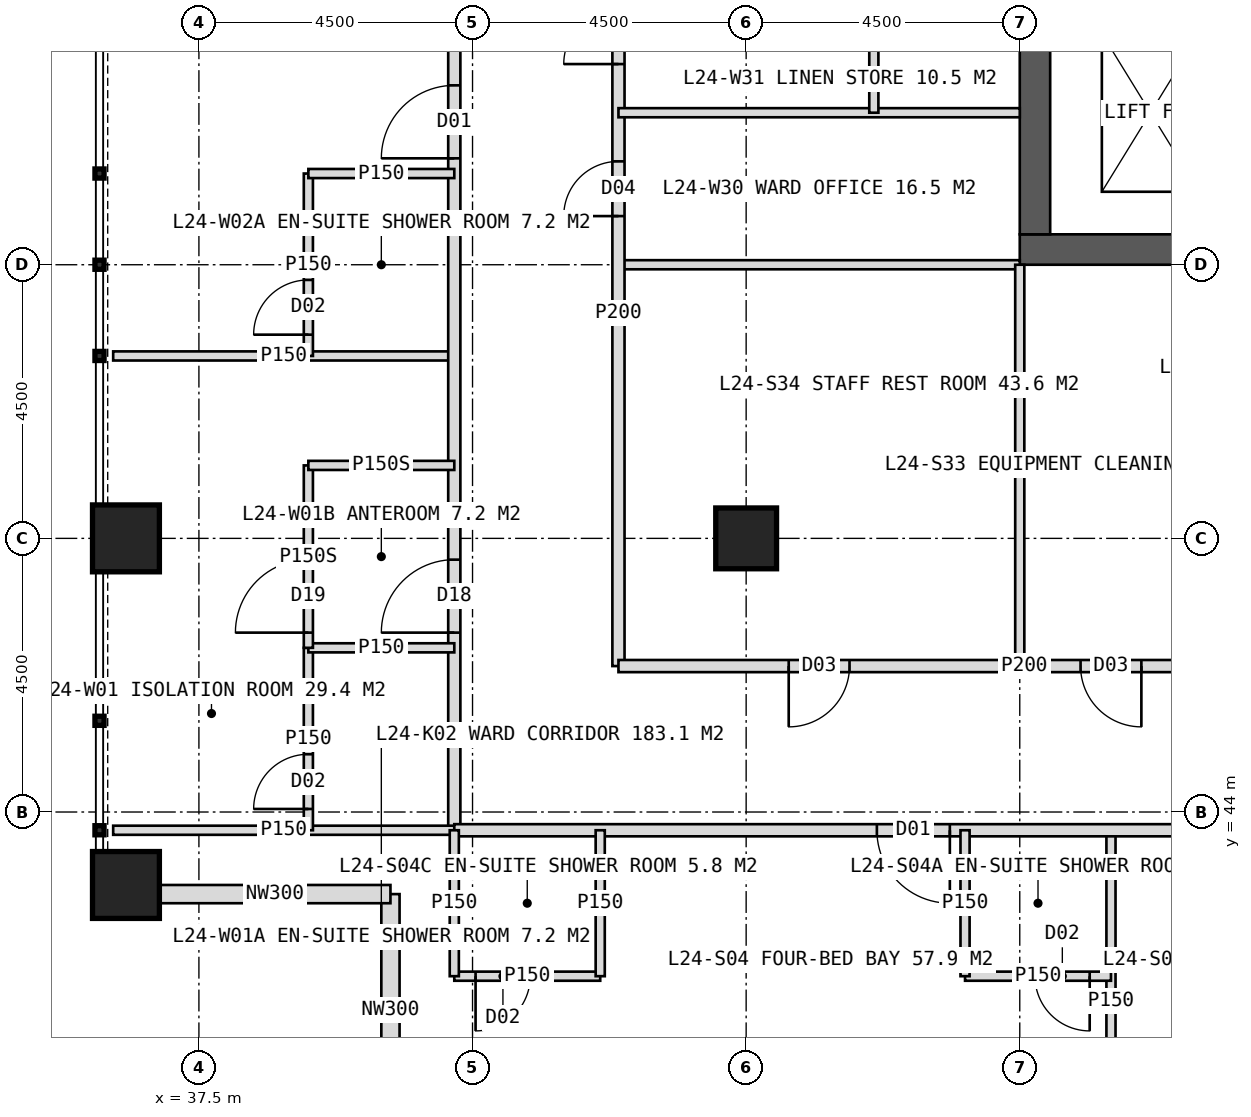
"""IFC4 building model, lengths in metres.
Left out: names, types, materials, properties, quantities, classifications, styles, units other than length and angle.
Written with IfcOpenShell. Run it as: python <this file> out.ifc"""

import sys

from ifc_helpers import new_model, si_unit, direction, frame, frame_2d, origin, origin_2d, place, context, subcontext, project, spatial, rectangle, hollow_rectangle, extrude, element, fill, save


model = new_model("IFC4")
c1 = context("Model", 3, precision=1e-05, world=origin(), true_north=direction((0.0, 1.0)))
c2 = subcontext(c1, "Body", "Model", "MODEL_VIEW")
j1 = project(units=[si_unit("LENGTHUNIT", "METRE"), si_unit("PLANEANGLEUNIT", "RADIAN")], contexts=[c1])
p1 = place(None, origin())
s1 = spatial("IfcSite", under=j1, at=p1, CompositionType="ELEMENT")
p2 = place(p1, origin())
s2 = spatial("IfcBuilding", under=s1, at=p2, CompositionType="ELEMENT")
p3 = place(p2, frame((0.0, 0.0, 104.0)))
s3 = spatial("IfcBuildingStorey", under=s2, at=p3, CompositionType="ELEMENT", Elevation=104.0)
p4 = place(p3, frame((51.0, 53.25, 0.0), z_axis=(0.0, 0.0, 1.0), x_axis=(1.0, 0.0, 0.0)))
e1 = element("IfcWall", 1, at=p4, inside=s3, PredefinedType="SHEAR", context=c2, shape_type="SweptSolid", body=[
    extrude(rectangle(XDim=18.0, YDim=0.5, at=frame_2d((9.0, 0.0))), origin(), (0.0, 0.0, 1.0), 4.0),
])
p5 = place(p4, frame((8.1, 0.0, 0.0)))
e2 = element("IfcOpeningElement", 2, at=p5, cuts=e1, PredefinedType="OPENING", context=c2, shape_type="SweptSolid", body=[
    extrude(rectangle(XDim=1.8, YDim=2.2, at=frame_2d((0.9, 1.1))), frame((0.0, 0.26, 0.0), z_axis=(0.0, -1.0, 0.0), x_axis=(1.0, 0.0, 0.0)), (0.0, 0.0, 1.0), 0.52),
])
p6 = place(p3, frame((51.25, 53.5, 0.0), z_axis=(0.0, 0.0, 1.0), x_axis=(0.0, 1.0, 0.0)))
e3 = element("IfcWall", 3, at=p6, inside=s3, PredefinedType="SHEAR", context=c2, shape_type="SweptSolid", body=[
    extrude(rectangle(XDim=17.0, YDim=0.5, at=frame_2d((8.5, 0.0))), origin(), (0.0, 0.0, 1.0), 4.0),
])
p7 = place(p6, frame((6.0, 0.0, 0.0)))
e4 = element("IfcOpeningElement", 4, at=p7, cuts=e3, PredefinedType="OPENING", context=c2, shape_type="SweptSolid", body=[
    extrude(rectangle(XDim=1.5, YDim=2.2, at=frame_2d((0.75, 1.1))), frame((0.0, 0.26, 0.0), z_axis=(0.0, -1.0, 0.0), x_axis=(1.0, 0.0, 0.0)), (0.0, 0.0, 1.0), 0.52),
])
p8 = place(p3, frame((46.5, 48.5, 0.0), z_axis=(0.0, 0.0, 1.0), x_axis=(1.0, 0.0, 0.0)))
e5 = element("IfcColumn", 5, at=p8, inside=s3, PredefinedType="COLUMN", context=c2, shape_type="SweptSolid", body=[
    extrude(hollow_rectangle(XDim=1.0, YDim=1.0, WallThickness=0.1, at=origin_2d()), origin(), (0.0, 0.0, 1.0), 4.0),
])
for number, where, z_axis, x_axis in (
    (6, (36.3, 42.8, 0.0), (0.0, 0.0, 1.0), (1.0, 0.0, 0.0)),
    (7, (36.3, 48.5, 0.0), (0.0, 0.0, 1.0), (1.0, 0.0, 0.0)),
):
    element("IfcColumn", number, at=place(p3, frame(where, z_axis=z_axis, x_axis=x_axis)), inside=s3, PredefinedType="COLUMN", context=c2, shape_type="SweptSolid", body=[
        extrude(hollow_rectangle(XDim=1.1, YDim=1.1, WallThickness=0.1, at=origin_2d()), origin(), (0.0, 0.0, 1.0), 4.0),
    ])
for number, where, z_axis, x_axis in (
    (8, (40.65, 38.85, 0.0), (0.0, 0.0, 1.0), (0.0, 1.0, 0.0)),
    (9, (40.65, 42.65, 0.0), (0.0, 0.0, 1.0), (-1.0, 0.0, 0.0)),
):
    element("IfcWall", number, at=place(p3, frame(where, z_axis=z_axis, x_axis=x_axis)), inside=s3, PredefinedType="ELEMENTEDWALL", context=c2, shape_type="SweptSolid", body=[
        extrude(rectangle(XDim=3.8, YDim=0.3, at=frame_2d((1.9, 0.0))), origin(), (0.0, 0.0, 1.0), 4.0),
    ])
p9 = place(p3, frame((41.7, 51.5, 0.0), z_axis=(0.0, 0.0, 1.0), x_axis=(-1.0, 0.0, 0.0)))
e10 = element("IfcWall", 10, at=p9, inside=s3, PredefinedType="PARTITIONING", context=c2, shape_type="SweptSolid", body=[
    extrude(rectangle(XDim=5.61, YDim=0.15, at=frame_2d((2.805, 0.0))), origin(), (0.0, 0.0, 1.0), 3.75),
])
p10 = place(p3, frame((41.7, 43.7, 0.0), z_axis=(0.0, 0.0, 1.0), x_axis=(0.0, 1.0, 0.0)))
e11 = element("IfcWall", 11, at=p10, inside=s3, PredefinedType="PARTITIONING", context=c2, shape_type="SweptSolid", body=[
    extrude(rectangle(XDim=36.6, YDim=0.2, at=frame_2d((18.3, 0.0))), origin(), (0.0, 0.0, 1.0), 3.75),
])
p11 = place(p10, frame((3.25, 0.0, 0.0)))
e12 = element("IfcOpeningElement", 12, at=p11, cuts=e11, PredefinedType="OPENING", context=c2, shape_type="SweptSolid", body=[
    extrude(rectangle(XDim=1.2, YDim=2.2, at=frame_2d((0.6, 1.1))), frame((0.0, 0.11, 0.0), z_axis=(0.0, -1.0, 0.0), x_axis=(1.0, 0.0, 0.0)), (0.0, 0.0, 1.0), 0.22),
])
p12 = place(p10, frame((11.05, 0.0, 0.0)))
e13 = element("IfcOpeningElement", 13, at=p12, cuts=e11, PredefinedType="OPENING", context=c2, shape_type="SweptSolid", body=[
    extrude(rectangle(XDim=1.2, YDim=2.2, at=frame_2d((0.6, 1.1))), frame((0.0, 0.11, 0.0), z_axis=(0.0, -1.0, 0.0), x_axis=(1.0, 0.0, 0.0)), (0.0, 0.0, 1.0), 0.22),
])
p13 = place(p10, frame((21.55, 0.0, 0.0)))
e14 = element("IfcOpeningElement", 14, at=p13, cuts=e11, PredefinedType="OPENING", context=c2, shape_type="SweptSolid", body=[
    extrude(rectangle(XDim=1.2, YDim=2.2, at=frame_2d((0.6, 1.1))), frame((0.0, 0.11, 0.0), z_axis=(0.0, -1.0, 0.0), x_axis=(1.0, 0.0, 0.0)), (0.0, 0.0, 1.0), 0.22),
])
p14 = place(p10, frame((32.05, 0.0, 0.0)))
e15 = element("IfcOpeningElement", 15, at=p14, cuts=e11, PredefinedType="OPENING", context=c2, shape_type="SweptSolid", body=[
    extrude(rectangle(XDim=1.2, YDim=2.2, at=frame_2d((0.6, 1.1))), frame((0.0, 0.11, 0.0), z_axis=(0.0, -1.0, 0.0), x_axis=(1.0, 0.0, 0.0)), (0.0, 0.0, 1.0), 0.22),
])
p15 = place(p3, frame((41.7, 43.7, 0.0), z_axis=(0.0, 0.0, 1.0), x_axis=(-1.0, 0.0, 0.0)))
e16 = element("IfcWall", 16, at=p15, inside=s3, PredefinedType="PARTITIONING", context=c2, shape_type="SweptSolid", body=[
    extrude(rectangle(XDim=5.61, YDim=0.15, at=frame_2d((2.805, 0.0))), origin(), (0.0, 0.0, 1.0), 3.75),
])
p16 = place(p3, frame((39.3, 43.7, 0.0), z_axis=(0.0, 0.0, 1.0), x_axis=(0.0, 1.0, 0.0)))
e17 = element("IfcWall", 17, at=p16, inside=s3, PredefinedType="PARTITIONING", context=c2, shape_type="SweptSolid", body=[
    extrude(rectangle(XDim=3.0, YDim=0.15, at=frame_2d((1.5, 0.0))), origin(), (0.0, 0.0, 1.0), 3.75),
])
p17 = place(p16, frame((0.35, 0.0, 0.0)))
e18 = element("IfcOpeningElement", 18, at=p17, cuts=e17, PredefinedType="OPENING", context=c2, shape_type="SweptSolid", body=[
    extrude(rectangle(XDim=0.9, YDim=2.1, at=frame_2d((0.45, 1.05))), frame((0.0, 0.085, 0.0), z_axis=(0.0, -1.0, 0.0), x_axis=(1.0, 0.0, 0.0)), (0.0, 0.0, 1.0), 0.17),
])
p18 = place(p3, frame((41.7, 46.7, 0.0), z_axis=(0.0, 0.0, 1.0), x_axis=(-1.0, 0.0, 0.0)))
e19 = element("IfcWall", 19, at=p18, inside=s3, PredefinedType="PARTITIONING", context=c2, shape_type="SweptSolid", body=[
    extrude(rectangle(XDim=2.4, YDim=0.15, at=frame_2d((1.2, 0.0))), origin(), (0.0, 0.0, 1.0), 3.75),
])
p19 = place(p3, frame((39.3, 46.7, 0.0), z_axis=(0.0, 0.0, 1.0), x_axis=(0.0, 1.0, 0.0)))
e20 = element("IfcWall", 20, at=p19, inside=s3, PredefinedType="PARTITIONING", context=c2, shape_type="SweptSolid", body=[
    extrude(rectangle(XDim=3.0, YDim=0.15, at=frame_2d((1.5, 0.0))), origin(), (0.0, 0.0, 1.0), 3.75),
])
p20 = place(p19, frame((0.25, 0.0, 0.0)))
e21 = element("IfcOpeningElement", 21, at=p20, cuts=e20, PredefinedType="OPENING", context=c2, shape_type="SweptSolid", body=[
    extrude(rectangle(XDim=1.2, YDim=2.2, at=frame_2d((0.6, 1.1))), frame((0.0, 0.085, 0.0), z_axis=(0.0, -1.0, 0.0), x_axis=(1.0, 0.0, 0.0)), (0.0, 0.0, 1.0), 0.17),
])
p21 = place(p3, frame((41.7, 49.7, 0.0), z_axis=(0.0, 0.0, 1.0), x_axis=(-1.0, 0.0, 0.0)))
e22 = element("IfcWall", 22, at=p21, inside=s3, PredefinedType="PARTITIONING", context=c2, shape_type="SweptSolid", body=[
    extrude(rectangle(XDim=2.4, YDim=0.15, at=frame_2d((1.2, 0.0))), origin(), (0.0, 0.0, 1.0), 3.75),
])
p22 = place(p3, frame((39.3, 51.5, 0.0), z_axis=(0.0, 0.0, 1.0), x_axis=(0.0, 1.0, 0.0)))
e23 = element("IfcWall", 23, at=p22, inside=s3, PredefinedType="PARTITIONING", context=c2, shape_type="SweptSolid", body=[
    extrude(rectangle(XDim=3.0, YDim=0.15, at=frame_2d((1.5, 0.0))), origin(), (0.0, 0.0, 1.0), 3.75),
])
p23 = place(p22, frame((0.35, 0.0, 0.0)))
e24 = element("IfcOpeningElement", 24, at=p23, cuts=e23, PredefinedType="OPENING", context=c2, shape_type="SweptSolid", body=[
    extrude(rectangle(XDim=0.9, YDim=2.1, at=frame_2d((0.45, 1.05))), frame((0.0, 0.085, 0.0), z_axis=(0.0, -1.0, 0.0), x_axis=(1.0, 0.0, 0.0)), (0.0, 0.0, 1.0), 0.17),
])
p24 = place(p3, frame((41.7, 54.5, 0.0), z_axis=(0.0, 0.0, 1.0), x_axis=(-1.0, 0.0, 0.0)))
e25 = element("IfcWall", 25, at=p24, inside=s3, PredefinedType="PARTITIONING", context=c2, shape_type="SweptSolid", body=[
    extrude(rectangle(XDim=2.4, YDim=0.15, at=frame_2d((1.2, 0.0))), origin(), (0.0, 0.0, 1.0), 3.75),
])
p25 = place(p3, frame((51.0, 53.0, 0.0), z_axis=(0.0, 0.0, 1.0), x_axis=(-1.0, 0.0, 0.0)))
e26 = element("IfcWall", 26, at=p25, inside=s3, PredefinedType="PARTITIONING", context=c2, shape_type="SweptSolid", body=[
    extrude(rectangle(XDim=6.6, YDim=0.15, at=frame_2d((3.3, 0.0))), origin(), (0.0, 0.0, 1.0), 3.75),
])
p26 = place(p3, frame((44.4, 46.4, 0.0), z_axis=(0.0, 0.0, 1.0), x_axis=(0.0, 1.0, 0.0)))
e27 = element("IfcWall", 27, at=p26, inside=s3, PredefinedType="PARTITIONING", context=c2, shape_type="SweptSolid", body=[
    extrude(rectangle(XDim=11.6, YDim=0.2, at=frame_2d((5.8, 0.0))), origin(), (0.0, 0.0, 1.0), 3.75),
])
p27 = place(p26, frame((7.4, 0.0, 0.0)))
e28 = element("IfcOpeningElement", 28, at=p27, cuts=e27, PredefinedType="OPENING", context=c2, shape_type="SweptSolid", body=[
    extrude(rectangle(XDim=0.9, YDim=2.1, at=frame_2d((0.45, 1.05))), frame((0.0, 0.11, 0.0), z_axis=(0.0, -1.0, 0.0), x_axis=(1.0, 0.0, 0.0)), (0.0, 0.0, 1.0), 0.22),
])
p28 = place(p26, frame((9.9, 0.0, 0.0)))
e29 = element("IfcOpeningElement", 29, at=p28, cuts=e27, PredefinedType="OPENING", context=c2, shape_type="SweptSolid", body=[
    extrude(rectangle(XDim=0.9, YDim=2.1, at=frame_2d((0.45, 1.05))), frame((0.0, 0.11, 0.0), z_axis=(0.0, -1.0, 0.0), x_axis=(1.0, 0.0, 0.0)), (0.0, 0.0, 1.0), 0.22),
])
p29 = place(p3, frame((51.0, 55.5, 0.0), z_axis=(0.0, 0.0, 1.0), x_axis=(-1.0, 0.0, 0.0)))
e30 = element("IfcWall", 30, at=p29, inside=s3, PredefinedType="PARTITIONING", context=c2, shape_type="SweptSolid", body=[
    extrude(rectangle(XDim=6.6, YDim=0.15, at=frame_2d((3.3, 0.0))), origin(), (0.0, 0.0, 1.0), 3.75),
])
p30 = place(p3, frame((48.6, 55.5, 0.0), z_axis=(0.0, 0.0, 1.0), x_axis=(0.0, 1.0, 0.0)))
e31 = element("IfcWall", 31, at=p30, inside=s3, PredefinedType="PARTITIONING", context=c2, shape_type="SweptSolid", body=[
    extrude(rectangle(XDim=2.5, YDim=0.15, at=frame_2d((1.25, 0.0))), origin(), (0.0, 0.0, 1.0), 3.75),
])
p31 = place(p3, frame((52.5, 43.7, 0.0), z_axis=(0.0, 0.0, 1.0), x_axis=(0.0, -1.0, 0.0)))
e32 = element("IfcWall", 32, at=p31, inside=s3, PredefinedType="PARTITIONING", context=c2, shape_type="SweptSolid", body=[
    extrude(rectangle(XDim=5.61, YDim=0.15, at=frame_2d((2.805, 0.0))), origin(), (0.0, 0.0, 1.0), 3.75),
])
p32 = place(p3, frame((78.3, 43.7, 0.0), z_axis=(0.0, 0.0, 1.0), x_axis=(-1.0, 0.0, 0.0)))
e33 = element("IfcWall", 33, at=p32, inside=s3, PredefinedType="PARTITIONING", context=c2, shape_type="SweptSolid", body=[
    extrude(rectangle(XDim=36.6, YDim=0.2, at=frame_2d((18.3, 0.0))), origin(), (0.0, 0.0, 1.0), 3.75),
])
p33 = place(p32, frame((3.25, 0.0, 0.0)))
e34 = element("IfcOpeningElement", 34, at=p33, cuts=e33, PredefinedType="OPENING", context=c2, shape_type="SweptSolid", body=[
    extrude(rectangle(XDim=1.2, YDim=2.2, at=frame_2d((0.6, 1.1))), frame((0.0, 0.11, 0.0), z_axis=(0.0, -1.0, 0.0), x_axis=(1.0, 0.0, 0.0)), (0.0, 0.0, 1.0), 0.22),
])
p34 = place(p32, frame((11.05, 0.0, 0.0)))
e35 = element("IfcOpeningElement", 35, at=p34, cuts=e33, PredefinedType="OPENING", context=c2, shape_type="SweptSolid", body=[
    extrude(rectangle(XDim=1.2, YDim=2.2, at=frame_2d((0.6, 1.1))), frame((0.0, 0.11, 0.0), z_axis=(0.0, -1.0, 0.0), x_axis=(1.0, 0.0, 0.0)), (0.0, 0.0, 1.0), 0.22),
])
p35 = place(p32, frame((20.05, 0.0, 0.0)))
e36 = element("IfcOpeningElement", 36, at=p35, cuts=e33, PredefinedType="OPENING", context=c2, shape_type="SweptSolid", body=[
    extrude(rectangle(XDim=1.2, YDim=2.2, at=frame_2d((0.6, 1.1))), frame((0.0, 0.11, 0.0), z_axis=(0.0, -1.0, 0.0), x_axis=(1.0, 0.0, 0.0)), (0.0, 0.0, 1.0), 0.22),
])
p36 = place(p32, frame((28.45, 0.0, 0.0)))
e37 = element("IfcOpeningElement", 37, at=p36, cuts=e33, PredefinedType="OPENING", context=c2, shape_type="SweptSolid", body=[
    extrude(rectangle(XDim=1.2, YDim=2.2, at=frame_2d((0.6, 1.1))), frame((0.0, 0.11, 0.0), z_axis=(0.0, -1.0, 0.0), x_axis=(1.0, 0.0, 0.0)), (0.0, 0.0, 1.0), 0.22),
])
p37 = place(p3, frame((52.5, 41.3, 0.0), z_axis=(0.0, 0.0, 1.0), x_axis=(-1.0, 0.0, 0.0)))
e38 = element("IfcWall", 38, at=p37, inside=s3, PredefinedType="PARTITIONING", context=c2, shape_type="SweptSolid", body=[
    extrude(rectangle(XDim=2.4, YDim=0.15, at=frame_2d((1.2, 0.0))), origin(), (0.0, 0.0, 1.0), 3.75),
])
p38 = place(p37, frame((0.35, 0.0, 0.0)))
e39 = element("IfcOpeningElement", 39, at=p38, cuts=e38, PredefinedType="OPENING", context=c2, shape_type="SweptSolid", body=[
    extrude(rectangle(XDim=0.9, YDim=2.1, at=frame_2d((0.45, 1.05))), frame((0.0, 0.085, 0.0), z_axis=(0.0, -1.0, 0.0), x_axis=(1.0, 0.0, 0.0)), (0.0, 0.0, 1.0), 0.17),
])
p39 = place(p3, frame((50.1, 43.7, 0.0), z_axis=(0.0, 0.0, 1.0), x_axis=(0.0, -1.0, 0.0)))
e40 = element("IfcWall", 40, at=p39, inside=s3, PredefinedType="PARTITIONING", context=c2, shape_type="SweptSolid", body=[
    extrude(rectangle(XDim=2.4, YDim=0.15, at=frame_2d((1.2, 0.0))), origin(), (0.0, 0.0, 1.0), 3.75),
])
p40 = place(p3, frame((44.1, 41.3, 0.0), z_axis=(0.0, 0.0, 1.0), x_axis=(-1.0, 0.0, 0.0)))
e41 = element("IfcWall", 41, at=p40, inside=s3, PredefinedType="PARTITIONING", context=c2, shape_type="SweptSolid", body=[
    extrude(rectangle(XDim=2.4, YDim=0.15, at=frame_2d((1.2, 0.0))), origin(), (0.0, 0.0, 1.0), 3.75),
])
p41 = place(p40, frame((1.15, 0.0, 0.0)))
e42 = element("IfcOpeningElement", 42, at=p41, cuts=e41, PredefinedType="OPENING", context=c2, shape_type="SweptSolid", body=[
    extrude(rectangle(XDim=0.9, YDim=2.1, at=frame_2d((0.45, 1.05))), frame((0.0, 0.085, 0.0), z_axis=(0.0, -1.0, 0.0), x_axis=(1.0, 0.0, 0.0)), (0.0, 0.0, 1.0), 0.17),
])
for number, where, z_axis, x_axis in (
    (43, (44.1, 43.7, 0.0), (0.0, 0.0, 1.0), (0.0, -1.0, 0.0)),
    (44, (41.7, 43.7, 0.0), (0.0, 0.0, 1.0), (0.0, -1.0, 0.0)),
):
    element("IfcWall", number, at=place(p3, frame(where, z_axis=z_axis, x_axis=x_axis)), inside=s3, PredefinedType="PARTITIONING", context=c2, shape_type="SweptSolid", body=[
        extrude(rectangle(XDim=2.4, YDim=0.15, at=frame_2d((1.2, 0.0))), origin(), (0.0, 0.0, 1.0), 3.75),
    ])
p42 = place(p3, frame((57.75, 46.4, 0.0), z_axis=(0.0, 0.0, 1.0), x_axis=(-1.0, 0.0, 0.0)))
e45 = element("IfcWall", 45, at=p42, inside=s3, PredefinedType="PARTITIONING", context=c2, shape_type="SweptSolid", body=[
    extrude(rectangle(XDim=13.35, YDim=0.2, at=frame_2d((6.675, 0.0))), origin(), (0.0, 0.0, 1.0), 3.75),
])
p43 = place(p42, frame((1.375, 0.0, 0.0)))
e46 = element("IfcOpeningElement", 46, at=p43, cuts=e45, PredefinedType="OPENING", context=c2, shape_type="SweptSolid", body=[
    extrude(rectangle(XDim=1.0, YDim=2.1, at=frame_2d((0.5, 1.05))), frame((0.0, 0.11, 0.0), z_axis=(0.0, -1.0, 0.0), x_axis=(1.0, 0.0, 0.0)), (0.0, 0.0, 1.0), 0.22),
])
p44 = place(p42, frame((4.75, 0.0, 0.0)))
e47 = element("IfcOpeningElement", 47, at=p44, cuts=e45, PredefinedType="OPENING", context=c2, shape_type="SweptSolid", body=[
    extrude(rectangle(XDim=1.0, YDim=2.1, at=frame_2d((0.5, 1.05))), frame((0.0, 0.11, 0.0), z_axis=(0.0, -1.0, 0.0), x_axis=(1.0, 0.0, 0.0)), (0.0, 0.0, 1.0), 0.22),
])
p45 = place(p42, frame((9.55, 0.0, 0.0)))
e48 = element("IfcOpeningElement", 48, at=p45, cuts=e45, PredefinedType="OPENING", context=c2, shape_type="SweptSolid", body=[
    extrude(rectangle(XDim=1.0, YDim=2.1, at=frame_2d((0.5, 1.05))), frame((0.0, 0.11, 0.0), z_axis=(0.0, -1.0, 0.0), x_axis=(1.0, 0.0, 0.0)), (0.0, 0.0, 1.0), 0.22),
])
p46 = place(p3, frame((51.0, 53.0, 0.0), z_axis=(0.0, 0.0, 1.0), x_axis=(0.0, -1.0, 0.0)))
e49 = element("IfcWall", 49, at=p46, inside=s3, PredefinedType="PARTITIONING", context=c2, shape_type="SweptSolid", body=[
    extrude(rectangle(XDim=6.6, YDim=0.15, at=frame_2d((3.3, 0.0))), origin(), (0.0, 0.0, 1.0), 3.75),
])
p47 = place(p20, origin())
e50 = element("IfcDoor", 50, at=p47, inside=s3, OperationType="SINGLE_SWING_LEFT", PredefinedType="DOOR", context=c2, shape_type="SweptSolid", body=[
    extrude(rectangle(XDim=1.2, YDim=2.2, at=frame_2d((0.6, 1.1))), frame((0.0, 0.025, 0.0), z_axis=(0.0, -1.0, 0.0), x_axis=(1.0, 0.0, 0.0)), (0.0, 0.0, 1.0), 0.05),
])
fill(e21, e50)
p48 = place(p11, origin())
e51 = element("IfcDoor", 51, at=p48, inside=s3, OperationType="SINGLE_SWING_LEFT", PredefinedType="DOOR", context=c2, shape_type="SweptSolid", body=[
    extrude(rectangle(XDim=1.2, YDim=2.2, at=frame_2d((0.6, 1.1))), frame((0.0, 0.025, 0.0), z_axis=(0.0, -1.0, 0.0), x_axis=(1.0, 0.0, 0.0)), (0.0, 0.0, 1.0), 0.05),
])
fill(e12, e51)
p49 = place(p17, origin())
e52 = element("IfcDoor", 52, at=p49, inside=s3, OperationType="SINGLE_SWING_LEFT", PredefinedType="DOOR", context=c2, shape_type="SweptSolid", body=[
    extrude(rectangle(XDim=0.9, YDim=2.1, at=frame_2d((0.45, 1.05))), frame((0.0, 0.025, 0.0), z_axis=(0.0, -1.0, 0.0), x_axis=(1.0, 0.0, 0.0)), (0.0, 0.0, 1.0), 0.05),
])
fill(e18, e52)
p50 = place(p12, origin())
e53 = element("IfcDoor", 53, at=p50, inside=s3, OperationType="SINGLE_SWING_LEFT", PredefinedType="DOOR", context=c2, shape_type="SweptSolid", body=[
    extrude(rectangle(XDim=1.2, YDim=2.2, at=frame_2d((0.6, 1.1))), frame((0.0, 0.025, 0.0), z_axis=(0.0, -1.0, 0.0), x_axis=(1.0, 0.0, 0.0)), (0.0, 0.0, 1.0), 0.05),
])
fill(e13, e53)
p51 = place(p23, origin())
e54 = element("IfcDoor", 54, at=p51, inside=s3, OperationType="SINGLE_SWING_LEFT", PredefinedType="DOOR", context=c2, shape_type="SweptSolid", body=[
    extrude(rectangle(XDim=0.9, YDim=2.1, at=frame_2d((0.45, 1.05))), frame((0.0, 0.025, 0.0), z_axis=(0.0, -1.0, 0.0), x_axis=(1.0, 0.0, 0.0)), (0.0, 0.0, 1.0), 0.05),
])
fill(e24, e54)
p52 = place(p27, origin())
e55 = element("IfcDoor", 55, at=p52, inside=s3, OperationType="SINGLE_SWING_LEFT", PredefinedType="DOOR", context=c2, shape_type="SweptSolid", body=[
    extrude(rectangle(XDim=0.9, YDim=2.1, at=frame_2d((0.45, 1.05))), frame((0.0, 0.025, 0.0), z_axis=(0.0, -1.0, 0.0), x_axis=(1.0, 0.0, 0.0)), (0.0, 0.0, 1.0), 0.05),
])
fill(e28, e55)
p53 = place(p28, origin())
e56 = element("IfcDoor", 56, at=p53, inside=s3, OperationType="SINGLE_SWING_LEFT", PredefinedType="DOOR", context=c2, shape_type="SweptSolid", body=[
    extrude(rectangle(XDim=0.9, YDim=2.1, at=frame_2d((0.45, 1.05))), frame((0.0, 0.025, 0.0), z_axis=(0.0, -1.0, 0.0), x_axis=(1.0, 0.0, 0.0)), (0.0, 0.0, 1.0), 0.05),
])
fill(e29, e56)
p54 = place(p36, origin())
e57 = element("IfcDoor", 57, at=p54, inside=s3, OperationType="SINGLE_SWING_LEFT", PredefinedType="DOOR", context=c2, shape_type="SweptSolid", body=[
    extrude(rectangle(XDim=1.2, YDim=2.2, at=frame_2d((0.6, 1.1))), frame((0.0, 0.025, 0.0), z_axis=(0.0, -1.0, 0.0), x_axis=(1.0, 0.0, 0.0)), (0.0, 0.0, 1.0), 0.05),
])
fill(e37, e57)
p55 = place(p38, origin())
e58 = element("IfcDoor", 58, at=p55, inside=s3, OperationType="SINGLE_SWING_LEFT", PredefinedType="DOOR", context=c2, shape_type="SweptSolid", body=[
    extrude(rectangle(XDim=0.9, YDim=2.1, at=frame_2d((0.45, 1.05))), frame((0.0, 0.025, 0.0), z_axis=(0.0, -1.0, 0.0), x_axis=(1.0, 0.0, 0.0)), (0.0, 0.0, 1.0), 0.05),
])
fill(e39, e58)
p56 = place(p41, origin())
e59 = element("IfcDoor", 59, at=p56, inside=s3, OperationType="SINGLE_SWING_RIGHT", PredefinedType="DOOR", context=c2, shape_type="SweptSolid", body=[
    extrude(rectangle(XDim=0.9, YDim=2.1, at=frame_2d((0.45, 1.05))), frame((0.0, 0.025, 0.0), z_axis=(0.0, -1.0, 0.0), x_axis=(1.0, 0.0, 0.0)), (0.0, 0.0, 1.0), 0.05),
])
fill(e42, e59)
p57 = place(p44, origin())
e60 = element("IfcDoor", 60, at=p57, inside=s3, OperationType="SINGLE_SWING_LEFT", PredefinedType="DOOR", context=c2, shape_type="SweptSolid", body=[
    extrude(rectangle(XDim=1.0, YDim=2.1, at=frame_2d((0.5, 1.05))), frame((0.0, 0.025, 0.0), z_axis=(0.0, -1.0, 0.0), x_axis=(1.0, 0.0, 0.0)), (0.0, 0.0, 1.0), 0.05),
])
fill(e47, e60)
p58 = place(p45, origin())
e61 = element("IfcDoor", 61, at=p58, inside=s3, OperationType="SINGLE_SWING_RIGHT", PredefinedType="DOOR", context=c2, shape_type="SweptSolid", body=[
    extrude(rectangle(XDim=1.0, YDim=2.1, at=frame_2d((0.5, 1.05))), frame((0.0, 0.025, 0.0), z_axis=(0.0, -1.0, 0.0), x_axis=(1.0, 0.0, 0.0)), (0.0, 0.0, 1.0), 0.05),
])
fill(e48, e61)
save(model, sys.argv[1])
